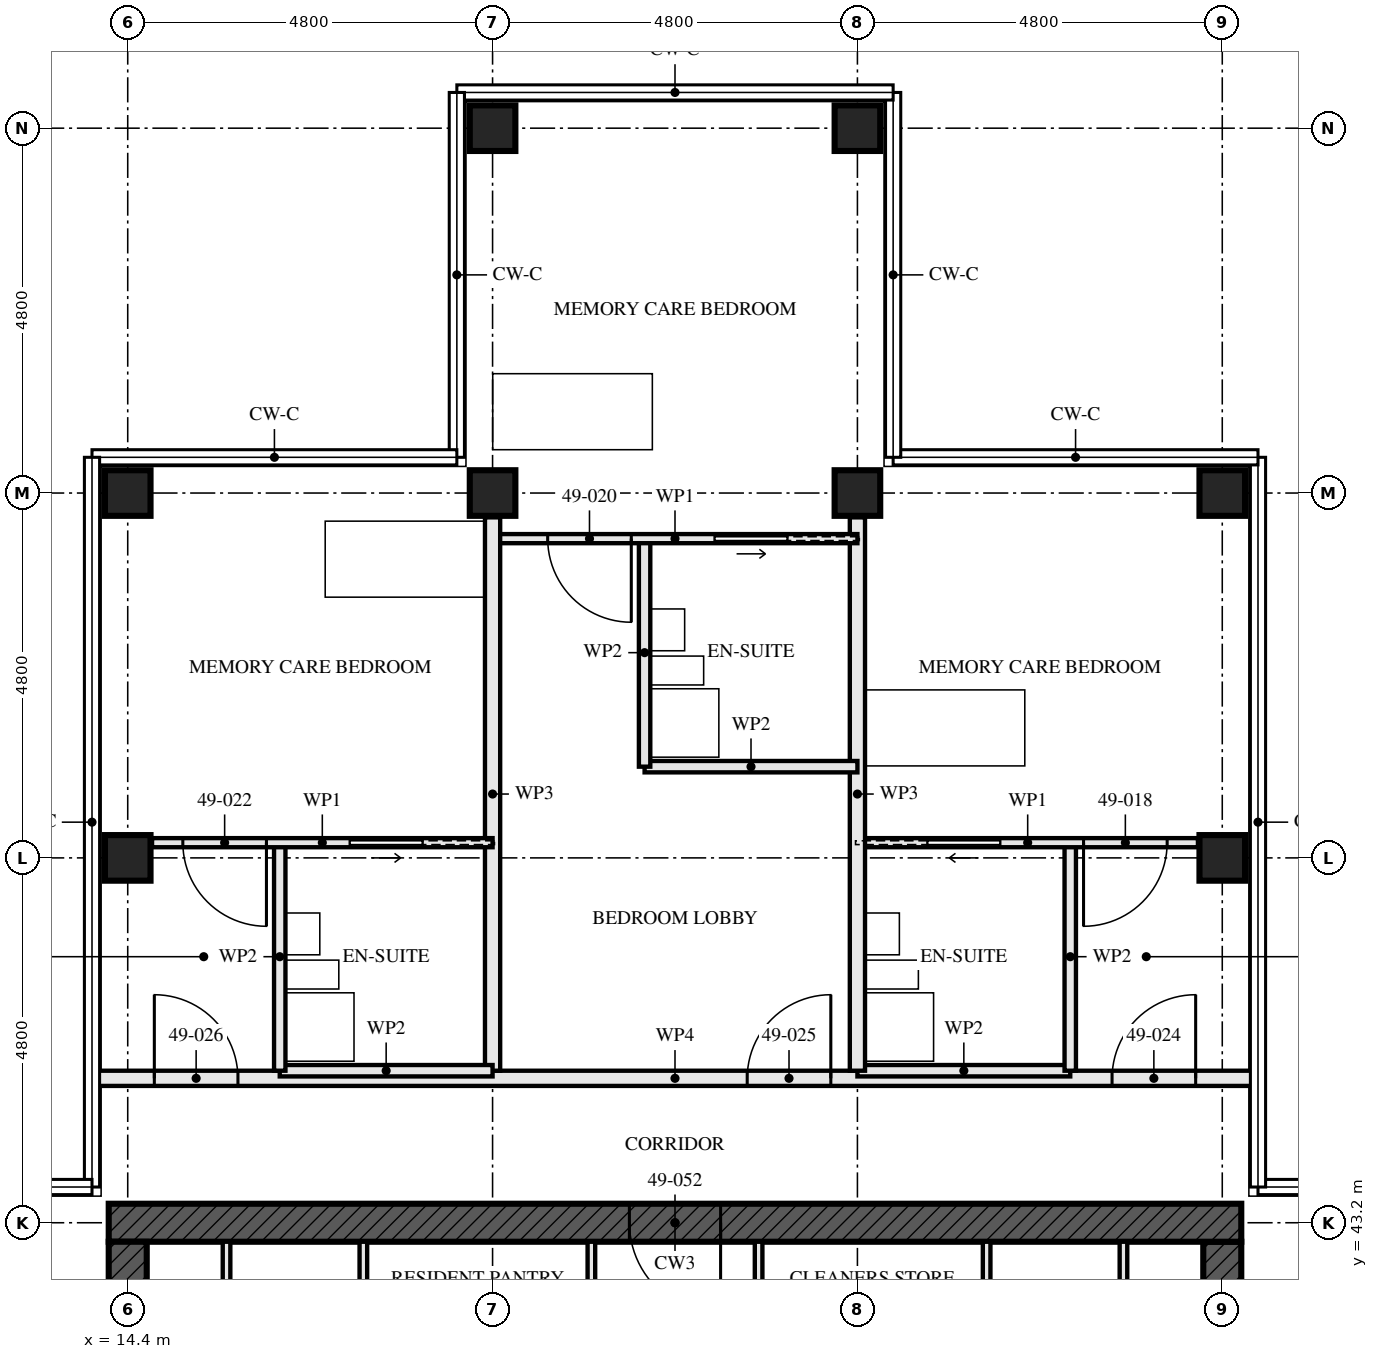
"""IFC4 building model, lengths in metres.
Left out: names, types, materials, properties, quantities, classifications, styles, units other than length and angle.
Written with IfcOpenShell. Run it as: python <this file> out.ifc"""

import sys

from ifc_helpers import new_model, si_unit, direction, frame, frame_2d, origin, origin_2d, place, context, subcontext, project, spatial, rectangle, hollow_rectangle, extrude, element, fill, save


model = new_model("IFC4")
c1 = context("Model", 3, precision=1e-05, world=origin(), true_north=direction((0.0, 1.0)))
c2 = subcontext(c1, "Body", "Model", "MODEL_VIEW")
j1 = project(units=[si_unit("LENGTHUNIT", "METRE"), si_unit("PLANEANGLEUNIT", "RADIAN")], contexts=[c1])
p1 = place(None, origin())
s1 = spatial("IfcSite", under=j1, at=p1, CompositionType="ELEMENT")
p2 = place(p1, origin())
s2 = spatial("IfcBuilding", under=s1, at=p2, CompositionType="ELEMENT")
p3 = place(p2, frame((0.0, 0.0, 179.5)))
s3 = spatial("IfcBuildingStorey", under=s2, at=p3, CompositionType="ELEMENT", Elevation=179.5)
for number, where, z_axis, x_axis in (
    (1, (14.4, 48.0, 0.0), (0.0, 0.0, 1.0), (1.0, 0.0, 0.0)),
    (2, (14.4, 52.8, 0.0), (0.0, 0.0, 1.0), (0.0, 1.0, 0.0)),
    (3, (19.2, 52.8, 0.0), (0.0, 0.0, 1.0), (0.0, 1.0, 0.0)),
    (4, (19.2, 57.6, 0.0), (0.0, 0.0, 1.0), (0.0, 1.0, 0.0)),
    (5, (24.0, 52.8, 0.0), (0.0, 0.0, 1.0), (0.0, 1.0, 0.0)),
    (6, (24.0, 57.6, 0.0), (0.0, 0.0, 1.0), (0.0, 1.0, 0.0)),
    (7, (28.8, 48.0, 0.0), (0.0, 0.0, 1.0), (1.0, 0.0, 0.0)),
    (8, (28.8, 52.8, 0.0), (0.0, 0.0, 1.0), (0.0, 1.0, 0.0)),
):
    element("IfcColumn", number, at=place(p3, frame(where, z_axis=z_axis, x_axis=x_axis)), inside=s3, PredefinedType="COLUMN", context=c2, shape_type="SweptSolid", body=[
        extrude(hollow_rectangle(XDim=0.6, YDim=0.6, WallThickness=0.08, at=origin_2d()), origin(), (0.0, 0.0, 1.0), 3.5),
    ])
p4 = place(p3, frame((29.05, 43.2, -0.17), z_axis=(0.0, 0.0, 1.0), x_axis=(-1.0, 0.0, 0.0)))
e9 = element("IfcWall", 9, at=p4, inside=s3, PredefinedType="SHEAR", context=c2, shape_type="SweptSolid", body=[
    extrude(rectangle(XDim=14.9, YDim=0.5, at=frame_2d((7.45, 0.0))), origin(), (0.0, 0.0, 1.0), 3.5),
])
p5 = place(p4, frame((6.85, 0.0, 0.17)))
e10 = element("IfcOpeningElement", 10, at=p5, cuts=e9, PredefinedType="OPENING", context=c2, shape_type="SweptSolid", body=[
    extrude(rectangle(XDim=1.2, YDim=2.1, at=frame_2d((0.6, 1.05))), frame((0.0, 0.26, 0.0), z_axis=(0.0, -1.0, 0.0), x_axis=(1.0, 0.0, 0.0)), (0.0, 0.0, 1.0), 0.521),
])
p6 = place(p3, frame((14.4, 42.95, -0.17), z_axis=(0.0, 0.0, 1.0), x_axis=(0.0, -1.0, 0.0)))
e11 = element("IfcWall", 11, at=p6, inside=s3, PredefinedType="SHEAR", context=c2, shape_type="SweptSolid", body=[
    extrude(rectangle(XDim=13.9, YDim=0.5, at=frame_2d((6.95, 0.0))), origin(), (0.0, 0.0, 1.0), 3.5),
])
p7 = place(p6, frame((6.35, 0.0, 0.17)))
e12 = element("IfcOpeningElement", 12, at=p7, cuts=e11, PredefinedType="OPENING", context=c2, shape_type="SweptSolid", body=[
    extrude(rectangle(XDim=1.2, YDim=2.1, at=frame_2d((0.6, 1.05))), frame((0.0, 0.26, 0.0), z_axis=(0.0, -1.0, 0.0), x_axis=(1.0, 0.0, 0.0)), (0.0, 0.0, 1.0), 0.521),
])
p8 = place(p3, frame((28.8, 29.05, -0.17), z_axis=(0.0, 0.0, 1.0), x_axis=(0.0, 1.0, 0.0)))
e13 = element("IfcWall", 13, at=p8, inside=s3, PredefinedType="SHEAR", context=c2, shape_type="SweptSolid", body=[
    extrude(rectangle(XDim=13.9, YDim=0.5, at=frame_2d((6.95, 0.0))), origin(), (0.0, 0.0, 1.0), 3.5),
])
p9 = place(p8, frame((6.35, 0.0, 0.17)))
e14 = element("IfcOpeningElement", 14, at=p9, cuts=e13, PredefinedType="OPENING", context=c2, shape_type="SweptSolid", body=[
    extrude(rectangle(XDim=1.2, YDim=2.1, at=frame_2d((0.6, 1.05))), frame((0.0, 0.26, 0.0), z_axis=(0.0, -1.0, 0.0), x_axis=(1.0, 0.0, 0.0)), (0.0, 0.0, 1.0), 0.521),
])
p10 = place(p3, frame((26.8, 48.2, 0.0), z_axis=(0.0, 0.0, 1.0), x_axis=(0.0, -1.0, 0.0)))
e15 = element("IfcWall", 15, at=p10, inside=s3, PredefinedType="PARTITIONING", context=c2, shape_type="SweptSolid", body=[
    extrude(rectangle(XDim=3.0, YDim=0.15, at=frame_2d((1.5, 0.0))), origin(), (0.0, 0.0, 1.0), 2.55),
])
p11 = place(p3, frame((26.8, 45.2, 0.0), z_axis=(0.0, 0.0, 1.0), x_axis=(-1.0, 0.0, 0.0)))
e16 = element("IfcWall", 16, at=p11, inside=s3, PredefinedType="PARTITIONING", context=c2, shape_type="SweptSolid", body=[
    extrude(rectangle(XDim=2.8, YDim=0.15, at=frame_2d((1.4, 0.0))), origin(), (0.0, 0.0, 1.0), 3.33),
])
p12 = place(p3, frame((28.48, 48.2, 0.0), z_axis=(0.0, 0.0, 1.0), x_axis=(-1.0, 0.0, 0.0)))
e17 = element("IfcWall", 17, at=p12, inside=s3, PredefinedType="PARTITIONING", context=c2, shape_type="SweptSolid", body=[
    extrude(rectangle(XDim=4.48, YDim=0.12, at=frame_2d((2.24, 0.0))), origin(), (0.0, 0.0, 1.0), 3.33),
])
p13 = place(p12, frame((0.405, 0.0, 0.0)))
e18 = element("IfcOpeningElement", 18, at=p13, cuts=e17, PredefinedType="OPENING", context=c2, shape_type="SweptSolid", body=[
    extrude(rectangle(XDim=1.1, YDim=2.1, at=frame_2d((0.55, 1.05))), frame((0.0, 0.071, 0.0), z_axis=(0.0, -1.0, 0.0), x_axis=(1.0, 0.0, 0.0)), (0.0, 0.0, 1.0), 0.141),
])
p14 = place(p12, frame((2.605, 0.0, 0.0)))
e19 = element("IfcOpeningElement", 19, at=p14, cuts=e17, PredefinedType="OPENING", context=c2, shape_type="SweptSolid", body=[
    extrude(rectangle(XDim=0.95, YDim=2.1, at=frame_2d((0.475, 1.05))), frame((0.0, 0.071, 0.0), z_axis=(0.0, -1.0, 0.0), x_axis=(1.0, 0.0, 0.0)), (0.0, 0.0, 1.0), 0.141),
])
p15 = place(p3, frame((24.0, 52.48, 0.0), z_axis=(0.0, 0.0, 1.0), x_axis=(0.0, -1.0, 0.0)))
e20 = element("IfcWall", 20, at=p15, inside=s3, PredefinedType="PARTITIONING", context=c2, shape_type="SweptSolid", body=[
    extrude(rectangle(XDim=7.28, YDim=0.2, at=frame_2d((3.64, 0.0))), origin(), (0.0, 0.0, 1.0), 2.55),
])
p16 = place(p3, frame((21.2, 52.2, 0.0), z_axis=(0.0, 0.0, 1.0), x_axis=(0.0, -1.0, 0.0)))
e21 = element("IfcWall", 21, at=p16, inside=s3, PredefinedType="PARTITIONING", context=c2, shape_type="SweptSolid", body=[
    extrude(rectangle(XDim=3.0, YDim=0.15, at=frame_2d((1.5, 0.0))), origin(), (0.0, 0.0, 1.0), 3.33),
])
p17 = place(p3, frame((24.0, 49.2, 0.0), z_axis=(0.0, 0.0, 1.0), x_axis=(-1.0, 0.0, 0.0)))
e22 = element("IfcWall", 22, at=p17, inside=s3, PredefinedType="PARTITIONING", context=c2, shape_type="SweptSolid", body=[
    extrude(rectangle(XDim=2.8, YDim=0.15, at=frame_2d((1.4, 0.0))), origin(), (0.0, 0.0, 1.0), 3.33),
])
p18 = place(p3, frame((24.0, 52.2, 0.0), z_axis=(0.0, 0.0, 1.0), x_axis=(-1.0, 0.0, 0.0)))
e23 = element("IfcWall", 23, at=p18, inside=s3, PredefinedType="PARTITIONING", context=c2, shape_type="SweptSolid", body=[
    extrude(rectangle(XDim=4.8, YDim=0.12, at=frame_2d((2.4, 0.0))), origin(), (0.0, 0.0, 1.0), 3.33),
])
p19 = place(p18, frame((2.975, 0.0, 0.0)))
e24 = element("IfcOpeningElement", 24, at=p19, cuts=e23, PredefinedType="OPENING", context=c2, shape_type="SweptSolid", body=[
    extrude(rectangle(XDim=1.1, YDim=2.1, at=frame_2d((0.55, 1.05))), frame((0.0, 0.071, 0.0), z_axis=(0.0, -1.0, 0.0), x_axis=(1.0, 0.0, 0.0)), (0.0, 0.0, 1.0), 0.141),
])
p20 = place(p18, frame((0.925, 0.0, 0.0)))
e25 = element("IfcOpeningElement", 25, at=p20, cuts=e23, PredefinedType="OPENING", context=c2, shape_type="SweptSolid", body=[
    extrude(rectangle(XDim=0.95, YDim=2.1, at=frame_2d((0.475, 1.05))), frame((0.0, 0.071, 0.0), z_axis=(0.0, -1.0, 0.0), x_axis=(1.0, 0.0, 0.0)), (0.0, 0.0, 1.0), 0.141),
])
p21 = place(p3, frame((19.2, 52.48, 0.0), z_axis=(0.0, 0.0, 1.0), x_axis=(0.0, -1.0, 0.0)))
e26 = element("IfcWall", 26, at=p21, inside=s3, PredefinedType="PARTITIONING", context=c2, shape_type="SweptSolid", body=[
    extrude(rectangle(XDim=7.28, YDim=0.2, at=frame_2d((3.64, 0.0))), origin(), (0.0, 0.0, 1.0), 2.55),
])
p22 = place(p3, frame((16.4, 48.2, 0.0), z_axis=(0.0, 0.0, 1.0), x_axis=(0.0, -1.0, 0.0)))
e27 = element("IfcWall", 27, at=p22, inside=s3, PredefinedType="PARTITIONING", context=c2, shape_type="SweptSolid", body=[
    extrude(rectangle(XDim=3.0, YDim=0.15, at=frame_2d((1.5, 0.0))), origin(), (0.0, 0.0, 1.0), 2.55),
])
p23 = place(p3, frame((19.2, 45.2, 0.0), z_axis=(0.0, 0.0, 1.0), x_axis=(-1.0, 0.0, 0.0)))
e28 = element("IfcWall", 28, at=p23, inside=s3, PredefinedType="PARTITIONING", context=c2, shape_type="SweptSolid", body=[
    extrude(rectangle(XDim=2.8, YDim=0.15, at=frame_2d((1.4, 0.0))), origin(), (0.0, 0.0, 1.0), 3.33),
])
p24 = place(p3, frame((19.2, 48.2, 0.0), z_axis=(0.0, 0.0, 1.0), x_axis=(-1.0, 0.0, 0.0)))
e29 = element("IfcWall", 29, at=p24, inside=s3, PredefinedType="PARTITIONING", context=c2, shape_type="SweptSolid", body=[
    extrude(rectangle(XDim=4.48, YDim=0.12, at=frame_2d((2.24, 0.0))), origin(), (0.0, 0.0, 1.0), 3.33),
])
p25 = place(p24, frame((2.975, 0.0, 0.0)))
e30 = element("IfcOpeningElement", 30, at=p25, cuts=e29, PredefinedType="OPENING", context=c2, shape_type="SweptSolid", body=[
    extrude(rectangle(XDim=1.1, YDim=2.1, at=frame_2d((0.55, 1.05))), frame((0.0, 0.071, 0.0), z_axis=(0.0, -1.0, 0.0), x_axis=(1.0, 0.0, 0.0)), (0.0, 0.0, 1.0), 0.141),
])
p26 = place(p24, frame((0.925, 0.0, 0.0)))
e31 = element("IfcOpeningElement", 31, at=p26, cuts=e29, PredefinedType="OPENING", context=c2, shape_type="SweptSolid", body=[
    extrude(rectangle(XDim=0.95, YDim=2.1, at=frame_2d((0.475, 1.05))), frame((0.0, 0.071, 0.0), z_axis=(0.0, -1.0, 0.0), x_axis=(1.0, 0.0, 0.0)), (0.0, 0.0, 1.0), 0.141),
])
p27 = place(p3, frame((29.25, 45.1, 0.0), z_axis=(0.0, 0.0, 1.0), x_axis=(-1.0, 0.0, 0.0)))
e32 = element("IfcWall", 32, at=p27, inside=s3, PredefinedType="PARTITIONING", context=c2, shape_type="SweptSolid", body=[
    extrude(rectangle(XDim=15.3, YDim=0.2, at=frame_2d((7.65, 0.0))), origin(), (0.0, 0.0, 1.0), 2.32),
])
p28 = place(p27, frame((0.8, 0.0, 0.0)))
e33 = element("IfcOpeningElement", 33, at=p28, cuts=e32, PredefinedType="OPENING", context=c2, shape_type="SweptSolid", body=[
    extrude(rectangle(XDim=1.1, YDim=2.1, at=frame_2d((0.55, 1.05))), frame((0.0, 0.111, 0.0), z_axis=(0.0, -1.0, 0.0), x_axis=(1.0, 0.0, 0.0)), (0.0, 0.0, 1.0), 0.221),
])
p29 = place(p27, frame((5.6, 0.0, 0.0)))
e34 = element("IfcOpeningElement", 34, at=p29, cuts=e32, PredefinedType="OPENING", context=c2, shape_type="SweptSolid", body=[
    extrude(rectangle(XDim=1.1, YDim=2.1, at=frame_2d((0.55, 1.05))), frame((0.0, 0.111, 0.0), z_axis=(0.0, -1.0, 0.0), x_axis=(1.0, 0.0, 0.0)), (0.0, 0.0, 1.0), 0.221),
])
p30 = place(p27, frame((13.4, 0.0, 0.0)))
e35 = element("IfcOpeningElement", 35, at=p30, cuts=e32, PredefinedType="OPENING", context=c2, shape_type="SweptSolid", body=[
    extrude(rectangle(XDim=1.1, YDim=2.1, at=frame_2d((0.55, 1.05))), frame((0.0, 0.111, 0.0), z_axis=(0.0, -1.0, 0.0), x_axis=(1.0, 0.0, 0.0)), (0.0, 0.0, 1.0), 0.221),
])
for number, where, z_axis, x_axis in (
    (36, (15.7, 37.15, 0.0), (0.0, 0.0, 1.0), (0.0, 1.0, 0.0)),
    (37, (27.5, 37.15, 0.0), (0.0, 0.0, 1.0), (0.0, 1.0, 0.0)),
):
    element("IfcWall", number, at=place(p3, frame(where, z_axis=z_axis, x_axis=x_axis)), inside=s3, PredefinedType="SOLIDWALL", context=c2, shape_type="SweptSolid", body=[
        extrude(rectangle(XDim=5.8, YDim=0.1, at=frame_2d((2.9, 0.0))), origin(), (0.0, 0.0, 1.0), 3.33),
    ])
p31 = place(p3, frame((20.5, 37.15, 0.0), z_axis=(0.0, 0.0, 1.0), x_axis=(0.0, 1.0, 0.0)))
e38 = element("IfcWall", 38, at=p31, inside=s3, PredefinedType="SOLIDWALL", context=c2, shape_type="SweptSolid", body=[
    extrude(rectangle(XDim=5.8, YDim=0.1, at=frame_2d((2.9, 0.0))), origin(), (0.0, 0.0, 1.0), 3.33),
])
p32 = place(p31, frame((0.975, 0.0, 0.0)))
e39 = element("IfcOpeningElement", 39, at=p32, cuts=e38, PredefinedType="OPENING", context=c2, shape_type="SweptSolid", body=[
    extrude(rectangle(XDim=0.9, YDim=2.1, at=frame_2d((0.45, 1.05))), frame((0.0, 0.061, 0.0), z_axis=(0.0, -1.0, 0.0), x_axis=(1.0, 0.0, 0.0)), (0.0, 0.0, 1.0), 0.121),
])
p33 = place(p3, frame((22.7, 37.15, 0.0), z_axis=(0.0, 0.0, 1.0), x_axis=(0.0, 1.0, 0.0)))
e40 = element("IfcWall", 40, at=p33, inside=s3, PredefinedType="SOLIDWALL", context=c2, shape_type="SweptSolid", body=[
    extrude(rectangle(XDim=5.8, YDim=0.1, at=frame_2d((2.9, 0.0))), origin(), (0.0, 0.0, 1.0), 3.33),
])
p34 = place(p33, frame((0.925, 0.0, 0.0)))
e41 = element("IfcOpeningElement", 41, at=p34, cuts=e40, PredefinedType="OPENING", context=c2, shape_type="SweptSolid", body=[
    extrude(rectangle(XDim=1.0, YDim=2.1, at=frame_2d((0.5, 1.05))), frame((0.0, 0.061, 0.0), z_axis=(0.0, -1.0, 0.0), x_axis=(1.0, 0.0, 0.0)), (0.0, 0.0, 1.0), 0.121),
])
for number, where, z_axis, x_axis in (
    (42, (17.5, 37.15, 0.0), (0.0, 0.0, 1.0), (0.0, 1.0, 0.0)),
    (43, (25.7, 37.15, 0.0), (0.0, 0.0, 1.0), (0.0, 1.0, 0.0)),
):
    element("IfcWall", number, at=place(p3, frame(where, z_axis=z_axis, x_axis=x_axis)), inside=s3, PredefinedType="SOLIDWALL", context=c2, shape_type="SweptSolid", body=[
        extrude(rectangle(XDim=5.8, YDim=0.1, at=frame_2d((2.9, 0.0))), origin(), (0.0, 0.0, 1.0), 3.33),
    ])
p35 = place(p13, origin())
e44 = element("IfcDoor", 44, at=p35, inside=s3, OperationType="SINGLE_SWING_LEFT", PredefinedType="DOOR", context=c2, shape_type="SweptSolid", body=[
    extrude(rectangle(XDim=1.1, YDim=2.1, at=frame_2d((0.55, 1.05))), frame((0.0, 0.022, 0.0), z_axis=(0.0, -1.0, 0.0), x_axis=(1.0, 0.0, 0.0)), (0.0, 0.0, 1.0), 0.044),
])
fill(e18, e44)
p36 = place(p14, origin())
e45 = element("IfcDoor", 45, at=p36, inside=s3, OperationType="SLIDING_TO_LEFT", PredefinedType="DOOR", context=c2, shape_type="SweptSolid", body=[
    extrude(rectangle(XDim=0.95, YDim=2.1, at=frame_2d((0.475, 1.05))), frame((0.0, 0.022, 0.0), z_axis=(0.0, -1.0, 0.0), x_axis=(1.0, 0.0, 0.0)), (0.0, 0.0, 1.0), 0.044),
])
fill(e19, e45)
p37 = place(p19, origin())
e46 = element("IfcDoor", 46, at=p37, inside=s3, OperationType="SINGLE_SWING_RIGHT", PredefinedType="DOOR", context=c2, shape_type="SweptSolid", body=[
    extrude(rectangle(XDim=1.1, YDim=2.1, at=frame_2d((0.55, 1.05))), frame((0.0, 0.022, 0.0), z_axis=(0.0, -1.0, 0.0), x_axis=(1.0, 0.0, 0.0)), (0.0, 0.0, 1.0), 0.044),
])
fill(e24, e46)
p38 = place(p20, origin())
e47 = element("IfcDoor", 47, at=p38, inside=s3, OperationType="SLIDING_TO_RIGHT", PredefinedType="DOOR", context=c2, shape_type="SweptSolid", body=[
    extrude(rectangle(XDim=0.95, YDim=2.1, at=frame_2d((0.475, 1.05))), frame((0.0, 0.022, 0.0), z_axis=(0.0, -1.0, 0.0), x_axis=(1.0, 0.0, 0.0)), (0.0, 0.0, 1.0), 0.044),
])
fill(e25, e47)
p39 = place(p25, origin())
e48 = element("IfcDoor", 48, at=p39, inside=s3, OperationType="SINGLE_SWING_RIGHT", PredefinedType="DOOR", context=c2, shape_type="SweptSolid", body=[
    extrude(rectangle(XDim=1.1, YDim=2.1, at=frame_2d((0.55, 1.05))), frame((0.0, 0.022, 0.0), z_axis=(0.0, -1.0, 0.0), x_axis=(1.0, 0.0, 0.0)), (0.0, 0.0, 1.0), 0.044),
])
fill(e30, e48)
p40 = place(p26, origin())
e49 = element("IfcDoor", 49, at=p40, inside=s3, OperationType="SLIDING_TO_RIGHT", PredefinedType="DOOR", context=c2, shape_type="SweptSolid", body=[
    extrude(rectangle(XDim=0.95, YDim=2.1, at=frame_2d((0.475, 1.05))), frame((0.0, 0.022, 0.0), z_axis=(0.0, -1.0, 0.0), x_axis=(1.0, 0.0, 0.0)), (0.0, 0.0, 1.0), 0.044),
])
fill(e31, e49)
p41 = place(p28, frame((1.1, 0.0, 0.0), z_axis=(0.0, 0.0, 1.0), x_axis=(-1.0, 0.0, 0.0)))
e50 = element("IfcDoor", 50, at=p41, inside=s3, OperationType="SINGLE_SWING_LEFT", PredefinedType="DOOR", context=c2, shape_type="SweptSolid", body=[
    extrude(rectangle(XDim=1.1, YDim=2.1, at=frame_2d((0.55, 1.05))), frame((0.0, 0.027, 0.0), z_axis=(0.0, -1.0, 0.0), x_axis=(1.0, 0.0, 0.0)), (0.0, 0.0, 1.0), 0.054),
])
fill(e33, e50)
p42 = place(p29, frame((1.1, 0.0, 0.0), z_axis=(0.0, 0.0, 1.0), x_axis=(-1.0, 0.0, 0.0)))
e51 = element("IfcDoor", 51, at=p42, inside=s3, OperationType="SINGLE_SWING_LEFT", PredefinedType="DOOR", context=c2, shape_type="SweptSolid", body=[
    extrude(rectangle(XDim=1.1, YDim=2.1, at=frame_2d((0.55, 1.05))), frame((0.0, 0.027, 0.0), z_axis=(0.0, -1.0, 0.0), x_axis=(1.0, 0.0, 0.0)), (0.0, 0.0, 1.0), 0.054),
])
fill(e34, e51)
p43 = place(p30, frame((1.1, 0.0, 0.0), z_axis=(0.0, 0.0, 1.0), x_axis=(-1.0, 0.0, 0.0)))
e52 = element("IfcDoor", 52, at=p43, inside=s3, OperationType="SINGLE_SWING_RIGHT", PredefinedType="DOOR", context=c2, shape_type="SweptSolid", body=[
    extrude(rectangle(XDim=1.1, YDim=2.1, at=frame_2d((0.55, 1.05))), frame((0.0, 0.027, 0.0), z_axis=(0.0, -1.0, 0.0), x_axis=(1.0, 0.0, 0.0)), (0.0, 0.0, 1.0), 0.054),
])
fill(e35, e52)
p44 = place(p5, origin())
e53 = element("IfcDoor", 53, at=p44, inside=s3, OperationType="SINGLE_SWING_LEFT", PredefinedType="DOOR", context=c2, shape_type="SweptSolid", body=[
    extrude(rectangle(XDim=1.2, YDim=2.1, at=frame_2d((0.6, 1.05))), frame((0.0, 0.027, 0.0), z_axis=(0.0, -1.0, 0.0), x_axis=(1.0, 0.0, 0.0)), (0.0, 0.0, 1.0), 0.054),
])
fill(e10, e53)
save(model, sys.argv[1])
